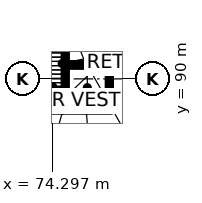
"""IFC4 building model, lengths in metres.
Left out: names, types, materials, properties, quantities, classifications, styles, units other than length and angle.
Written with IfcOpenShell. Run it as: python <this file> out.ifc"""

import sys

from ifc_helpers import new_model, si_unit, direction, frame, frame_2d, origin, place, context, subcontext, project, spatial, rectangle, extrude, element, fill, save


model = new_model("IFC4")
c1 = context("Model", 3, precision=1e-05, world=origin(), true_north=direction((0.0, 1.0)))
c2 = subcontext(c1, "Body", "Model", "MODEL_VIEW")
j1 = project(units=[si_unit("LENGTHUNIT", "METRE"), si_unit("PLANEANGLEUNIT", "RADIAN")], contexts=[c1])
p1 = place(None, origin())
s1 = spatial("IfcSite", under=j1, at=p1, CompositionType="ELEMENT")
p2 = place(p1, origin())
s2 = spatial("IfcBuilding", under=s1, at=p2, CompositionType="ELEMENT")
p3 = place(p2, origin())
s3 = spatial("IfcBuildingStorey", under=s2, at=p3, CompositionType="ELEMENT", Elevation=0.0)
p4 = place(p3, frame((71.8, 87.95, 0.0), z_axis=(0.0, 0.0, 1.0), x_axis=(1.0, 0.0, 0.0)))
e1 = element("IfcWall", 1, at=p4, inside=s3, PredefinedType="SHEAR", context=c2, shape_type="SweptSolid", body=[
    extrude(rectangle(XDim=6.4, YDim=0.3, at=frame_2d((3.2, 0.0))), origin(), (0.0, 0.0, 1.0), 7.7),
])
p5 = place(p4, frame((1.325, 0.0, 0.0)))
e2 = element("IfcOpeningElement", 2, at=p5, cuts=e1, PredefinedType="OPENING", context=c2, shape_type="SweptSolid", body=[
    extrude(rectangle(XDim=1.0, YDim=2.1, at=frame_2d((0.5, 1.05))), frame((0.0, 0.16, 0.0), z_axis=(0.0, -1.0, 0.0), x_axis=(1.0, 0.0, 0.0)), (0.0, 0.0, 1.0), 0.32),
])
p6 = place(p4, frame((4.125, 0.0, 0.0)))
e3 = element("IfcOpeningElement", 3, at=p6, cuts=e1, PredefinedType="OPENING", context=c2, shape_type="SweptSolid", body=[
    extrude(rectangle(XDim=1.2, YDim=2.1, at=frame_2d((0.6, 1.05))), frame((0.0, 0.16, 0.0), z_axis=(0.0, -1.0, 0.0), x_axis=(1.0, 0.0, 0.0)), (0.0, 0.0, 1.0), 0.32),
])
p7 = place(p3, frame((78.05, 88.1, 0.0), z_axis=(0.0, 0.0, 1.0), x_axis=(0.0, 1.0, 0.0)))
e4 = element("IfcWall", 4, at=p7, inside=s3, PredefinedType="SHEAR", context=c2, shape_type="SweptSolid", body=[
    extrude(rectangle(XDim=6.2, YDim=0.3, at=frame_2d((3.1, 0.0))), origin(), (0.0, 0.0, 1.0), 7.7),
])
p8 = place(p3, frame((75.3, 90.9, 0.0), z_axis=(0.0, 0.0, 1.0), x_axis=(1.0, 0.0, 0.0)))
e5 = element("IfcWall", 5, at=p8, inside=s3, PredefinedType="SHEAR", context=c2, shape_type="SweptSolid", body=[
    extrude(rectangle(XDim=2.6, YDim=0.3, at=frame_2d((1.3, 0.0))), origin(), (0.0, 0.0, 1.0), 7.7),
])
p9 = place(p8, frame((0.675, 0.0, 0.0)))
e6 = element("IfcOpeningElement", 6, at=p9, cuts=e5, PredefinedType="OPENING", context=c2, shape_type="SweptSolid", body=[
    extrude(rectangle(XDim=1.1, YDim=2.1, at=frame_2d((0.55, 1.05))), frame((0.0, 0.16, 0.0), z_axis=(0.0, -1.0, 0.0), x_axis=(1.0, 0.0, 0.0)), (0.0, 0.0, 1.0), 0.32),
])
p10 = place(p3, frame((75.15, 88.1, 0.0), z_axis=(0.0, 0.0, 1.0), x_axis=(0.0, 1.0, 0.0)))
e7 = element("IfcWall", 7, at=p10, inside=s3, PredefinedType="SHEAR", context=c2, shape_type="SweptSolid", body=[
    extrude(rectangle(XDim=6.2, YDim=0.3, at=frame_2d((3.1, 0.0))), origin(), (0.0, 0.0, 1.0), 7.7),
])
p11 = place(p10, frame((0.185, 0.0, 0.0)))
e8 = element("IfcOpeningElement", 8, at=p11, cuts=e7, PredefinedType="OPENING", context=c2, shape_type="SweptSolid", body=[
    extrude(rectangle(XDim=1.0, YDim=2.1, at=frame_2d((0.5, 1.05))), frame((0.0, 0.16, 0.0), z_axis=(0.0, -1.0, 0.0), x_axis=(1.0, 0.0, 0.0)), (0.0, 0.0, 1.0), 0.32),
])
p12 = place(p3, frame((107.504, 60.451, 0.0), z_axis=(0.0, 0.0, 1.0), x_axis=(-0.500000550228, 0.86602508611, 0.0)))
e9 = element("IfcWall", 9, at=p12, inside=s3, PredefinedType="SOLIDWALL", context=c2, shape_type="SweptSolid", body=[
    extrude(rectangle(XDim=57.704, YDim=0.3, at=frame_2d((28.852, 0.0))), origin(), (0.0, 0.0, 1.0), 7.7),
])
p13 = place(p12, frame((56.104, 0.0, 0.0)))
e10 = element("IfcOpeningElement", 10, at=p13, cuts=e9, PredefinedType="OPENING", context=c2, shape_type="SweptSolid", body=[
    extrude(rectangle(XDim=1.2, YDim=2.4, at=frame_2d((0.6, 1.2))), frame((0.0, 0.16, 0.0), z_axis=(0.0, -1.0, 0.0), x_axis=(1.0, 0.0, 0.0)), (0.0, 0.0, 1.0), 0.32),
])
p14 = place(p12, frame((1.552, 0.0, 0.15)))
e11 = element("IfcOpeningElement", 11, at=p14, cuts=e9, PredefinedType="OPENING", context=c2, shape_type="SweptSolid", body=[
    extrude(rectangle(XDim=2.1, YDim=5.4, at=frame_2d((1.05, 2.7))), frame((0.0, 0.16, 0.0), z_axis=(0.0, -1.0, 0.0), x_axis=(1.0, 0.0, 0.0)), (0.0, 0.0, 1.0), 0.32),
])
p15 = place(p12, frame((4.052, 0.0, 0.15)))
e12 = element("IfcOpeningElement", 12, at=p15, cuts=e9, PredefinedType="OPENING", context=c2, shape_type="SweptSolid", body=[
    extrude(rectangle(XDim=2.1, YDim=5.4, at=frame_2d((1.05, 2.7))), frame((0.0, 0.16, 0.0), z_axis=(0.0, -1.0, 0.0), x_axis=(1.0, 0.0, 0.0)), (0.0, 0.0, 1.0), 0.32),
])
p16 = place(p12, frame((6.552, 0.0, 0.15)))
e13 = element("IfcOpeningElement", 13, at=p16, cuts=e9, PredefinedType="OPENING", context=c2, shape_type="SweptSolid", body=[
    extrude(rectangle(XDim=2.1, YDim=5.4, at=frame_2d((1.05, 2.7))), frame((0.0, 0.16, 0.0), z_axis=(0.0, -1.0, 0.0), x_axis=(1.0, 0.0, 0.0)), (0.0, 0.0, 1.0), 0.32),
])
p17 = place(p12, frame((9.052, 0.0, 0.15)))
e14 = element("IfcOpeningElement", 14, at=p17, cuts=e9, PredefinedType="OPENING", context=c2, shape_type="SweptSolid", body=[
    extrude(rectangle(XDim=2.1, YDim=5.4, at=frame_2d((1.05, 2.7))), frame((0.0, 0.16, 0.0), z_axis=(0.0, -1.0, 0.0), x_axis=(1.0, 0.0, 0.0)), (0.0, 0.0, 1.0), 0.32),
])
p18 = place(p12, frame((11.552, 0.0, 0.15)))
e15 = element("IfcOpeningElement", 15, at=p18, cuts=e9, PredefinedType="OPENING", context=c2, shape_type="SweptSolid", body=[
    extrude(rectangle(XDim=2.1, YDim=5.4, at=frame_2d((1.05, 2.7))), frame((0.0, 0.16, 0.0), z_axis=(0.0, -1.0, 0.0), x_axis=(1.0, 0.0, 0.0)), (0.0, 0.0, 1.0), 0.32),
])
p19 = place(p12, frame((14.052, 0.0, 0.15)))
e16 = element("IfcOpeningElement", 16, at=p19, cuts=e9, PredefinedType="OPENING", context=c2, shape_type="SweptSolid", body=[
    extrude(rectangle(XDim=2.1, YDim=5.4, at=frame_2d((1.05, 2.7))), frame((0.0, 0.16, 0.0), z_axis=(0.0, -1.0, 0.0), x_axis=(1.0, 0.0, 0.0)), (0.0, 0.0, 1.0), 0.32),
])
p20 = place(p12, frame((16.552, 0.0, 0.15)))
e17 = element("IfcOpeningElement", 17, at=p20, cuts=e9, PredefinedType="OPENING", context=c2, shape_type="SweptSolid", body=[
    extrude(rectangle(XDim=2.1, YDim=5.4, at=frame_2d((1.05, 2.7))), frame((0.0, 0.16, 0.0), z_axis=(0.0, -1.0, 0.0), x_axis=(1.0, 0.0, 0.0)), (0.0, 0.0, 1.0), 0.32),
])
p21 = place(p12, frame((19.052, 0.0, 0.15)))
e18 = element("IfcOpeningElement", 18, at=p21, cuts=e9, PredefinedType="OPENING", context=c2, shape_type="SweptSolid", body=[
    extrude(rectangle(XDim=2.1, YDim=5.4, at=frame_2d((1.05, 2.7))), frame((0.0, 0.16, 0.0), z_axis=(0.0, -1.0, 0.0), x_axis=(1.0, 0.0, 0.0)), (0.0, 0.0, 1.0), 0.32),
])
p22 = place(p12, frame((21.552, 0.0, 0.15)))
e19 = element("IfcOpeningElement", 19, at=p22, cuts=e9, PredefinedType="OPENING", context=c2, shape_type="SweptSolid", body=[
    extrude(rectangle(XDim=2.1, YDim=5.4, at=frame_2d((1.05, 2.7))), frame((0.0, 0.16, 0.0), z_axis=(0.0, -1.0, 0.0), x_axis=(1.0, 0.0, 0.0)), (0.0, 0.0, 1.0), 0.32),
])
p23 = place(p12, frame((24.052, 0.0, 0.15)))
e20 = element("IfcOpeningElement", 20, at=p23, cuts=e9, PredefinedType="OPENING", context=c2, shape_type="SweptSolid", body=[
    extrude(rectangle(XDim=2.1, YDim=5.4, at=frame_2d((1.05, 2.7))), frame((0.0, 0.16, 0.0), z_axis=(0.0, -1.0, 0.0), x_axis=(1.0, 0.0, 0.0)), (0.0, 0.0, 1.0), 0.32),
])
p24 = place(p12, frame((26.552, 0.0, 0.15)))
e21 = element("IfcOpeningElement", 21, at=p24, cuts=e9, PredefinedType="OPENING", context=c2, shape_type="SweptSolid", body=[
    extrude(rectangle(XDim=2.1, YDim=5.4, at=frame_2d((1.05, 2.7))), frame((0.0, 0.16, 0.0), z_axis=(0.0, -1.0, 0.0), x_axis=(1.0, 0.0, 0.0)), (0.0, 0.0, 1.0), 0.32),
])
p25 = place(p12, frame((29.052, 0.0, 0.15)))
e22 = element("IfcOpeningElement", 22, at=p25, cuts=e9, PredefinedType="OPENING", context=c2, shape_type="SweptSolid", body=[
    extrude(rectangle(XDim=2.1, YDim=5.4, at=frame_2d((1.05, 2.7))), frame((0.0, 0.16, 0.0), z_axis=(0.0, -1.0, 0.0), x_axis=(1.0, 0.0, 0.0)), (0.0, 0.0, 1.0), 0.32),
])
p26 = place(p12, frame((31.552, 0.0, 0.15)))
e23 = element("IfcOpeningElement", 23, at=p26, cuts=e9, PredefinedType="OPENING", context=c2, shape_type="SweptSolid", body=[
    extrude(rectangle(XDim=2.1, YDim=5.4, at=frame_2d((1.05, 2.7))), frame((0.0, 0.16, 0.0), z_axis=(0.0, -1.0, 0.0), x_axis=(1.0, 0.0, 0.0)), (0.0, 0.0, 1.0), 0.32),
])
p27 = place(p12, frame((34.052, 0.0, 0.15)))
e24 = element("IfcOpeningElement", 24, at=p27, cuts=e9, PredefinedType="OPENING", context=c2, shape_type="SweptSolid", body=[
    extrude(rectangle(XDim=2.1, YDim=5.4, at=frame_2d((1.05, 2.7))), frame((0.0, 0.16, 0.0), z_axis=(0.0, -1.0, 0.0), x_axis=(1.0, 0.0, 0.0)), (0.0, 0.0, 1.0), 0.32),
])
p28 = place(p12, frame((36.552, 0.0, 0.15)))
e25 = element("IfcOpeningElement", 25, at=p28, cuts=e9, PredefinedType="OPENING", context=c2, shape_type="SweptSolid", body=[
    extrude(rectangle(XDim=2.1, YDim=5.4, at=frame_2d((1.05, 2.7))), frame((0.0, 0.16, 0.0), z_axis=(0.0, -1.0, 0.0), x_axis=(1.0, 0.0, 0.0)), (0.0, 0.0, 1.0), 0.32),
])
p29 = place(p12, frame((39.052, 0.0, 0.15)))
e26 = element("IfcOpeningElement", 26, at=p29, cuts=e9, PredefinedType="OPENING", context=c2, shape_type="SweptSolid", body=[
    extrude(rectangle(XDim=2.1, YDim=5.4, at=frame_2d((1.05, 2.7))), frame((0.0, 0.16, 0.0), z_axis=(0.0, -1.0, 0.0), x_axis=(1.0, 0.0, 0.0)), (0.0, 0.0, 1.0), 0.32),
])
p30 = place(p12, frame((41.552, 0.0, 0.15)))
e27 = element("IfcOpeningElement", 27, at=p30, cuts=e9, PredefinedType="OPENING", context=c2, shape_type="SweptSolid", body=[
    extrude(rectangle(XDim=2.1, YDim=5.4, at=frame_2d((1.05, 2.7))), frame((0.0, 0.16, 0.0), z_axis=(0.0, -1.0, 0.0), x_axis=(1.0, 0.0, 0.0)), (0.0, 0.0, 1.0), 0.32),
])
p31 = place(p12, frame((44.052, 0.0, 0.15)))
e28 = element("IfcOpeningElement", 28, at=p31, cuts=e9, PredefinedType="OPENING", context=c2, shape_type="SweptSolid", body=[
    extrude(rectangle(XDim=2.1, YDim=5.4, at=frame_2d((1.05, 2.7))), frame((0.0, 0.16, 0.0), z_axis=(0.0, -1.0, 0.0), x_axis=(1.0, 0.0, 0.0)), (0.0, 0.0, 1.0), 0.32),
])
p32 = place(p12, frame((46.552, 0.0, 0.15)))
e29 = element("IfcOpeningElement", 29, at=p32, cuts=e9, PredefinedType="OPENING", context=c2, shape_type="SweptSolid", body=[
    extrude(rectangle(XDim=2.1, YDim=5.4, at=frame_2d((1.05, 2.7))), frame((0.0, 0.16, 0.0), z_axis=(0.0, -1.0, 0.0), x_axis=(1.0, 0.0, 0.0)), (0.0, 0.0, 1.0), 0.32),
])
p33 = place(p12, frame((49.052, 0.0, 0.15)))
e30 = element("IfcOpeningElement", 30, at=p33, cuts=e9, PredefinedType="OPENING", context=c2, shape_type="SweptSolid", body=[
    extrude(rectangle(XDim=2.1, YDim=5.4, at=frame_2d((1.05, 2.7))), frame((0.0, 0.16, 0.0), z_axis=(0.0, -1.0, 0.0), x_axis=(1.0, 0.0, 0.0)), (0.0, 0.0, 1.0), 0.32),
])
p34 = place(p12, frame((51.552, 0.0, 0.15)))
e31 = element("IfcOpeningElement", 31, at=p34, cuts=e9, PredefinedType="OPENING", context=c2, shape_type="SweptSolid", body=[
    extrude(rectangle(XDim=2.1, YDim=5.4, at=frame_2d((1.05, 2.7))), frame((0.0, 0.16, 0.0), z_axis=(0.0, -1.0, 0.0), x_axis=(1.0, 0.0, 0.0)), (0.0, 0.0, 1.0), 0.32),
])
p35 = place(p9, origin())
e32 = element("IfcDoor", 32, at=p35, inside=s3, OperationType="DOUBLE_DOOR_SLIDING", PredefinedType="DOOR", context=c2, shape_type="SweptSolid", body=[
    extrude(rectangle(XDim=1.1, YDim=2.1, at=frame_2d((0.55, 1.05))), frame((0.0, 0.025, 0.0), z_axis=(0.0, -1.0, 0.0), x_axis=(1.0, 0.0, 0.0)), (0.0, 0.0, 1.0), 0.05),
])
fill(e6, e32)
p36 = place(p11, origin())
e33 = element("IfcDoor", 33, at=p36, inside=s3, OperationType="SINGLE_SWING_LEFT", PredefinedType="DOOR", context=c2, shape_type="SweptSolid", body=[
    extrude(rectangle(XDim=1.0, YDim=2.1, at=frame_2d((0.5, 1.05))), frame((0.0, 0.025, 0.0), z_axis=(0.0, -1.0, 0.0), x_axis=(1.0, 0.0, 0.0)), (0.0, 0.0, 1.0), 0.05),
])
fill(e8, e33)
p37 = place(p6, origin())
e34 = element("IfcDoor", 34, at=p37, inside=s3, OperationType="SINGLE_SWING_RIGHT", PredefinedType="DOOR", context=c2, shape_type="SweptSolid", body=[
    extrude(rectangle(XDim=1.2, YDim=2.1, at=frame_2d((0.6, 1.05))), frame((0.0, 0.025, 0.0), z_axis=(0.0, -1.0, 0.0), x_axis=(1.0, 0.0, 0.0)), (0.0, 0.0, 1.0), 0.05),
])
fill(e3, e34)
save(model, sys.argv[1])
